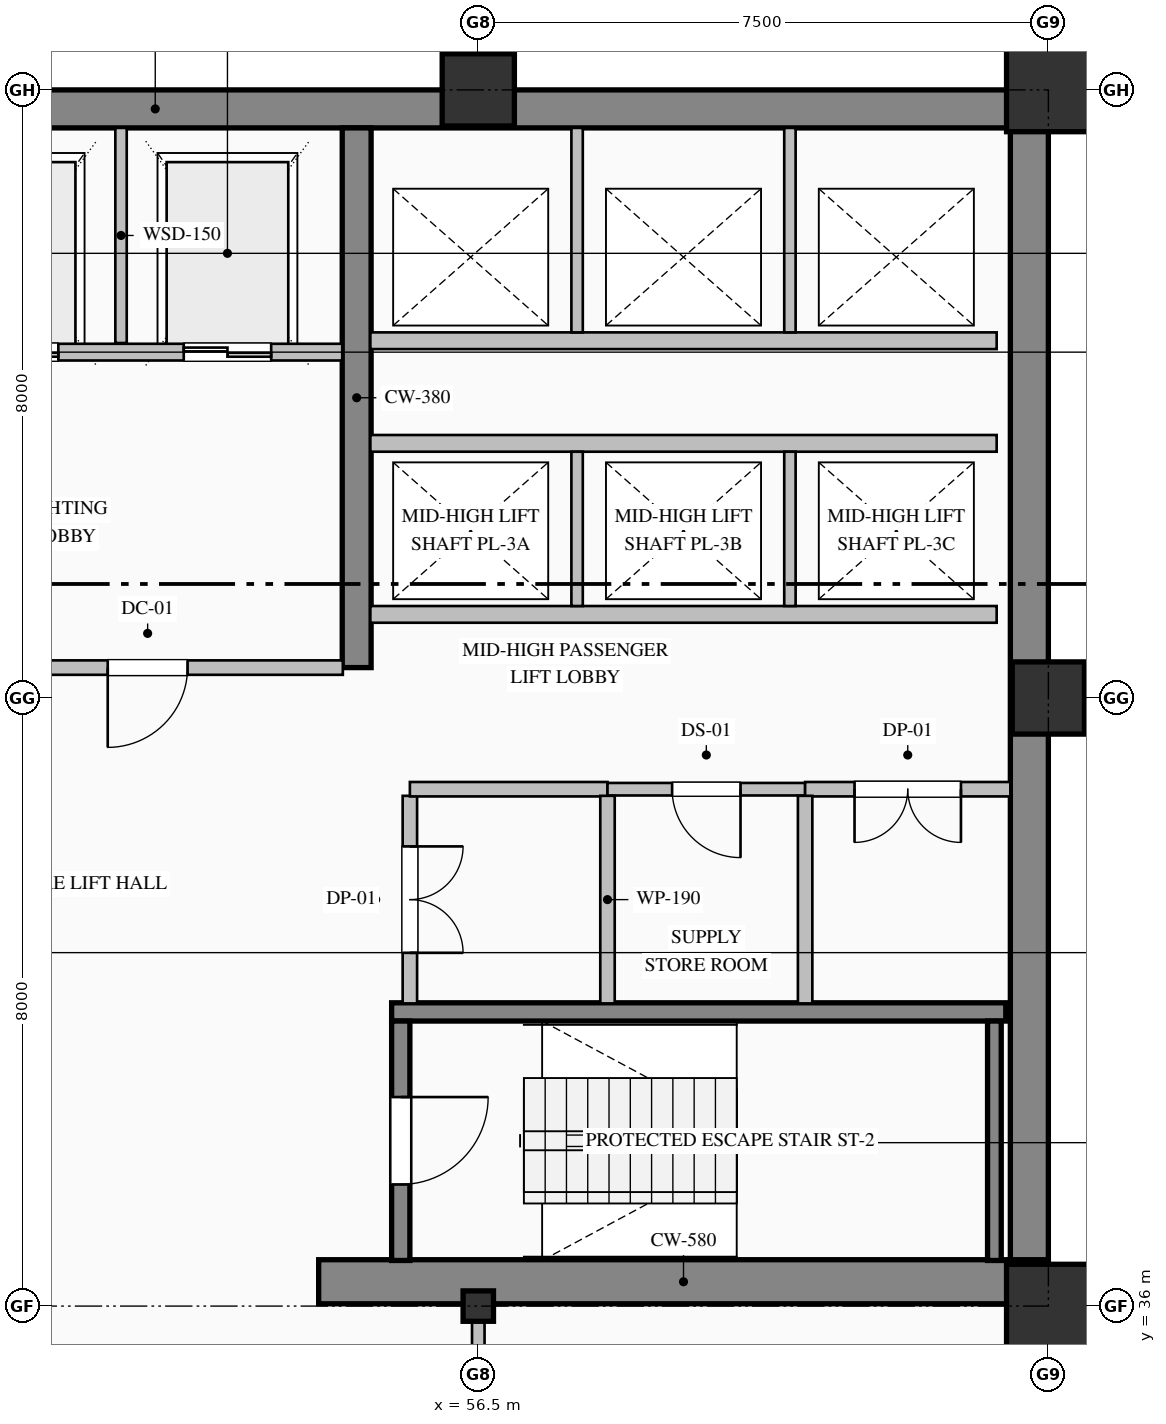
"""IFC4 building model, lengths in metres.
Left out: names, types, materials, properties, quantities, classifications, styles, units other than length and angle.
Written with IfcOpenShell. Run it as: python <this file> out.ifc"""

import sys

from ifc_helpers import new_model, si_unit, direction, frame, frame_2d, origin, origin_2d, place, context, subcontext, project, spatial, rectangle, hollow_rectangle, i_section, extrude, element, fill, save


model = new_model("IFC4")
c1 = context("Model", 3, precision=1e-05, world=origin(), true_north=direction((0.0, 1.0)))
c2 = subcontext(c1, "Body", "Model", "MODEL_VIEW")
j1 = project(units=[si_unit("LENGTHUNIT", "METRE"), si_unit("PLANEANGLEUNIT", "RADIAN")], contexts=[c1])
p1 = place(None, origin())
s1 = spatial("IfcSite", under=j1, at=p1, CompositionType="ELEMENT")
p2 = place(p1, origin())
s2 = spatial("IfcBuilding", under=s1, at=p2, CompositionType="ELEMENT")
p3 = place(p2, frame((0.0, 0.0, 143.0)))
s3 = spatial("IfcBuildingStorey", under=s2, at=p3, CompositionType="ELEMENT", Elevation=143.0)
p4 = place(p3, frame((40.5, 51.75, 0.0), z_axis=(0.0, 0.0, 1.0), x_axis=(1.0, 0.0, 0.0)))
e1 = element("IfcWall", 1, at=p4, inside=s3, PredefinedType="SHEAR", context=c2, shape_type="SweptSolid", body=[
    extrude(rectangle(XDim=23.5, YDim=0.5, at=frame_2d((11.75, 0.0))), origin(), (0.0, 0.0, 1.0), 3.765),
])
p5 = place(p3, frame((63.75, 36.32, 0.0), z_axis=(0.0, 0.0, 1.0), x_axis=(0.0, 1.0, 0.0)))
e2 = element("IfcWall", 2, at=p5, inside=s3, PredefinedType="SHEAR", context=c2, shape_type="SweptSolid", body=[
    extrude(rectangle(XDim=15.18, YDim=0.5, at=frame_2d((7.59, 0.0))), origin(), (0.0, 0.0, 1.0), 3.765),
])
p6 = place(p3, frame((54.4, 36.32, 0.0), z_axis=(0.0, 0.0, 1.0), x_axis=(1.0, 0.0, 0.0)))
e3 = element("IfcWall", 3, at=p6, inside=s3, PredefinedType="SHEAR", context=c2, shape_type="SweptSolid", body=[
    extrude(rectangle(XDim=9.6, YDim=0.58, at=frame_2d((4.8, 0.0))), origin(), (0.0, 0.0, 1.0), 4.0),
])
p7 = place(p3, frame((54.9, 44.4, 0.0), z_axis=(0.0, 0.0, 1.0), x_axis=(0.0, 1.0, 0.0)))
e4 = element("IfcWall", 4, at=p7, inside=s3, PredefinedType="SHEAR", context=c2, shape_type="SweptSolid", body=[
    extrude(rectangle(XDim=7.1, YDim=0.38, at=frame_2d((3.55, 0.0))), origin(), (0.0, 0.0, 1.0), 3.765),
])
p8 = place(p3, frame((56.5, 36.0, 0.0), z_axis=(0.0, 0.0, 1.0), x_axis=(1.0, 0.0, 0.0)))
e5 = element("IfcColumn", 5, at=p8, inside=s3, PredefinedType="COLUMN", context=c2, shape_type="SweptSolid", body=[
    extrude(i_section(OverallWidth=0.4, OverallDepth=0.4, WebThickness=0.013, FlangeThickness=0.021, FilletRadius=0.022, at=origin_2d()), origin(), (0.0, 0.0, 1.0), 4.0),
])
p9 = place(p3, frame((56.5, 52.0, 0.0), z_axis=(0.0, 0.0, 1.0), x_axis=(1.0, 0.0, 0.0)))
e6 = element("IfcColumn", 6, at=p9, inside=s3, PredefinedType="COLUMN", context=c2, shape_type="SweptSolid", body=[
    extrude(hollow_rectangle(XDim=0.95, YDim=0.95, WallThickness=0.036, at=origin_2d()), origin(), (0.0, 0.0, 1.0), 4.0),
])
p10 = place(p3, frame((64.0, 36.0, 0.0), z_axis=(0.0, 0.0, 1.0), x_axis=(1.0, 0.0, 0.0)))
e7 = element("IfcColumn", 7, at=p10, inside=s3, PredefinedType="COLUMN", context=c2, shape_type="SweptSolid", body=[
    extrude(hollow_rectangle(XDim=1.1, YDim=1.1, WallThickness=0.04, at=origin_2d()), origin(), (0.0, 0.0, 1.0), 4.0),
])
p11 = place(p3, frame((64.0, 44.0, 0.0), z_axis=(0.0, 0.0, 1.0), x_axis=(1.0, 0.0, 0.0)))
e8 = element("IfcColumn", 8, at=p11, inside=s3, PredefinedType="COLUMN", context=c2, shape_type="SweptSolid", body=[
    extrude(hollow_rectangle(XDim=0.95, YDim=0.95, WallThickness=0.036, at=origin_2d()), origin(), (0.0, 0.0, 1.0), 4.0),
])
p12 = place(p3, frame((64.0, 52.0, 0.0), z_axis=(0.0, 0.0, 1.0), x_axis=(1.0, 0.0, 0.0)))
e9 = element("IfcColumn", 9, at=p12, inside=s3, PredefinedType="COLUMN", context=c2, shape_type="SweptSolid", body=[
    extrude(hollow_rectangle(XDim=1.1, YDim=1.1, WallThickness=0.04, at=origin_2d()), origin(), (0.0, 0.0, 1.0), 4.0),
])
p13 = place(p3, frame((63.83, 36.05, 0.0), z_axis=(0.0, 0.0, 1.0), x_axis=(0.0, -1.0, 0.0)))
e10 = element("IfcWall", 10, at=p13, inside=s3, PredefinedType="SOLIDWALL", context=c2, shape_type="SweptSolid", body=[
    extrude(rectangle(XDim=28.05, YDim=0.34, at=frame_2d((14.025, 0.0))), origin(), (0.0, 0.0, 1.0), 3.265),
])
p14 = place(p13, frame((2.775, 0.0, 0.85)))
e11 = element("IfcOpeningElement", 11, at=p14, cuts=e10, PredefinedType="OPENING", context=c2, shape_type="SweptSolid", body=[
    extrude(rectangle(XDim=1.65, YDim=1.95, at=frame_2d((0.825, 0.975))), frame((0.0, 0.18, 0.0), z_axis=(0.0, -1.0, 0.0), x_axis=(1.0, 0.0, 0.0)), (0.0, 0.0, 1.0), 0.36),
])
p15 = place(p13, frame((10.05, 0.0, 0.85)))
e12 = element("IfcOpeningElement", 12, at=p15, cuts=e10, PredefinedType="OPENING", context=c2, shape_type="SweptSolid", body=[
    extrude(rectangle(XDim=1.5, YDim=1.95, at=frame_2d((0.75, 0.975))), frame((0.0, 0.18, 0.0), z_axis=(0.0, -1.0, 0.0), x_axis=(1.0, 0.0, 0.0)), (0.0, 0.0, 1.0), 0.36),
])
p16 = place(p3, frame((55.36, 39.87, 0.0), z_axis=(0.0, 0.0, 1.0), x_axis=(1.0, 0.0, 0.0)))
e13 = element("IfcWall", 13, at=p16, inside=s3, PredefinedType="SOLIDWALL", context=c2, shape_type="SweptSolid", body=[
    extrude(rectangle(XDim=8.08, YDim=0.24, at=frame_2d((4.04, 0.0))), origin(), (0.0, 0.0, 1.0), 4.0),
])
p17 = place(p3, frame((55.48, 39.75, 0.0), z_axis=(0.0, 0.0, 1.0), x_axis=(0.0, -1.0, 0.0)))
e14 = element("IfcWall", 14, at=p17, inside=s3, PredefinedType="SOLIDWALL", context=c2, shape_type="SweptSolid", body=[
    extrude(rectangle(XDim=3.15, YDim=0.24, at=frame_2d((1.575, 0.0))), origin(), (0.0, 0.0, 1.0), 4.0),
])
p18 = place(p17, frame((1.0, 0.0, 0.0)))
e15 = element("IfcOpeningElement", 15, at=p18, cuts=e14, PredefinedType="OPENING", context=c2, shape_type="SweptSolid", body=[
    extrude(rectangle(XDim=1.15, YDim=2.2, at=frame_2d((0.575, 1.1))), frame((0.0, 0.13, 0.0), z_axis=(0.0, -1.0, 0.0), x_axis=(1.0, 0.0, 0.0)), (0.0, 0.0, 1.0), 0.26),
])
p19 = place(p3, frame((63.29, 36.6, 0.0), z_axis=(0.0, 0.0, 1.0), x_axis=(0.0, 1.0, 0.0)))
e16 = element("IfcWall", 16, at=p19, inside=s3, PredefinedType="SOLIDWALL", context=c2, shape_type="SweptSolid", body=[
    extrude(rectangle(XDim=3.15, YDim=0.18, at=frame_2d((1.575, 0.0))), origin(), (0.0, 0.0, 1.0), 4.0),
])
p20 = place(p3, frame((54.71, 48.55, 0.0), z_axis=(0.0, 0.0, 1.0), x_axis=(-1.0, 0.0, 0.0)))
e17 = element("IfcWall", 17, at=p20, inside=s3, PredefinedType="PARTITIONING", context=c2, shape_type="SweptSolid", body=[
    extrude(rectangle(XDim=5.12, YDim=0.22, at=frame_2d((2.56, 0.0))), origin(), (0.0, 0.0, 1.0), 3.765),
])
p21 = place(p20, frame((3.735, 0.0, 0.0)))
e18 = element("IfcOpeningElement", 18, at=p21, cuts=e17, PredefinedType="OPENING", context=c2, shape_type="SweptSolid", body=[
    extrude(rectangle(XDim=1.15, YDim=2.2, at=frame_2d((0.575, 1.1))), frame((0.0, 0.12, 0.0), z_axis=(0.0, -1.0, 0.0), x_axis=(1.0, 0.0, 0.0)), (0.0, 0.0, 1.0), 0.24),
])
p22 = place(p20, frame((0.935, 0.0, 0.0)))
e19 = element("IfcOpeningElement", 19, at=p22, cuts=e17, PredefinedType="OPENING", context=c2, shape_type="SweptSolid", body=[
    extrude(rectangle(XDim=1.15, YDim=2.2, at=frame_2d((0.575, 1.1))), frame((0.0, 0.12, 0.0), z_axis=(0.0, -1.0, 0.0), x_axis=(1.0, 0.0, 0.0)), (0.0, 0.0, 1.0), 0.24),
])
p23 = place(p3, frame((51.8, 48.67, 0.0), z_axis=(0.0, 0.0, 1.0), x_axis=(0.0, 1.0, 0.0)))
e20 = element("IfcWall", 20, at=p23, inside=s3, PredefinedType="PARTITIONING", context=c2, shape_type="SweptSolid", body=[
    extrude(rectangle(XDim=2.83, YDim=0.15, at=frame_2d((1.415, 0.0))), origin(), (0.0, 0.0, 1.0), 3.765),
])
for number, where, z_axis, x_axis in (
    (21, (63.32, 45.1, 0.0), (0.0, 0.0, 1.0), (-1.0, 0.0, 0.0)),
    (22, (55.08, 47.35, 0.0), (0.0, 0.0, 1.0), (1.0, 0.0, 0.0)),
):
    element("IfcWall", number, at=place(p3, frame(where, z_axis=z_axis, x_axis=x_axis)), inside=s3, PredefinedType="PARTITIONING", context=c2, shape_type="SweptSolid", body=[
        extrude(rectangle(XDim=8.24, YDim=0.22, at=frame_2d((4.12, 0.0))), origin(), (0.0, 0.0, 1.0), 3.765),
    ])
for number, where, z_axis, x_axis in (
    (23, (57.8, 45.21, 0.0), (0.0, 0.0, 1.0), (0.0, 1.0, 0.0)),
    (24, (60.6, 45.21, 0.0), (0.0, 0.0, 1.0), (0.0, 1.0, 0.0)),
):
    element("IfcWall", number, at=place(p3, frame(where, z_axis=z_axis, x_axis=x_axis)), inside=s3, PredefinedType="PARTITIONING", context=c2, shape_type="SweptSolid", body=[
        extrude(rectangle(XDim=2.03, YDim=0.15, at=frame_2d((1.015, 0.0))), origin(), (0.0, 0.0, 1.0), 3.765),
    ])
p24 = place(p3, frame((63.32, 48.7, 0.0), z_axis=(0.0, 0.0, 1.0), x_axis=(-1.0, 0.0, 0.0)))
e25 = element("IfcWall", 25, at=p24, inside=s3, PredefinedType="PARTITIONING", context=c2, shape_type="SweptSolid", body=[
    extrude(rectangle(XDim=8.24, YDim=0.22, at=frame_2d((4.12, 0.0))), origin(), (0.0, 0.0, 1.0), 3.765),
])
for number, where, z_axis, x_axis in (
    (26, (57.8, 48.81, 0.0), (0.0, 0.0, 1.0), (0.0, 1.0, 0.0)),
    (27, (60.6, 48.81, 0.0), (0.0, 0.0, 1.0), (0.0, 1.0, 0.0)),
):
    element("IfcWall", number, at=place(p3, frame(where, z_axis=z_axis, x_axis=x_axis)), inside=s3, PredefinedType="PARTITIONING", context=c2, shape_type="SweptSolid", body=[
        extrude(rectangle(XDim=2.69, YDim=0.15, at=frame_2d((1.345, 0.0))), origin(), (0.0, 0.0, 1.0), 3.765),
    ])
p25 = place(p3, frame((54.718, 44.4, 0.0), z_axis=(0.0, 0.0, 1.0), x_axis=(-1.0, 0.0, 0.0)))
e28 = element("IfcWall", 28, at=p25, inside=s3, PredefinedType="PARTITIONING", context=c2, shape_type="SweptSolid", body=[
    extrude(rectangle(XDim=5.136, YDim=0.19, at=frame_2d((2.568, 0.0))), origin(), (0.0, 0.0, 1.0), 3.765),
])
p26 = place(p25, frame((2.043, 0.0, 0.0)))
e29 = element("IfcOpeningElement", 29, at=p26, cuts=e28, PredefinedType="OPENING", context=c2, shape_type="SweptSolid", body=[
    extrude(rectangle(XDim=1.05, YDim=2.15, at=frame_2d((0.525, 1.075))), frame((0.0, 0.105, 0.0), z_axis=(0.0, -1.0, 0.0), x_axis=(1.0, 0.0, 0.0)), (0.0, 0.0, 1.0), 0.21),
])
p27 = place(p3, frame((55.6, 42.713, 0.0), z_axis=(0.0, 0.0, 1.0), x_axis=(0.0, -1.0, 0.0)))
e30 = element("IfcWall", 30, at=p27, inside=s3, PredefinedType="PARTITIONING", context=c2, shape_type="SweptSolid", body=[
    extrude(rectangle(XDim=2.731, YDim=0.19, at=frame_2d((1.365, 0.0))), origin(), (0.0, 0.0, 1.0), 3.765),
])
p28 = place(p27, frame((0.666, 0.0, 0.0)))
e31 = element("IfcOpeningElement", 31, at=p28, cuts=e30, PredefinedType="OPENING", context=c2, shape_type="SweptSolid", body=[
    extrude(rectangle(XDim=1.4, YDim=2.25, at=frame_2d((0.7, 1.125))), frame((0.0, 0.105, 0.0), z_axis=(0.0, -1.0, 0.0), x_axis=(1.0, 0.0, 0.0)), (0.0, 0.0, 1.0), 0.21),
])
p29 = place(p3, frame((58.2, 42.8, 0.0), z_axis=(0.0, 0.0, 1.0), x_axis=(-1.0, 0.0, 0.0)))
e32 = element("IfcWall", 32, at=p29, inside=s3, PredefinedType="PARTITIONING", context=c2, shape_type="SweptSolid", body=[
    extrude(rectangle(XDim=2.6, YDim=0.19, at=frame_2d((1.3, 0.0))), origin(), (0.0, 0.0, 1.0), 3.765),
])
p30 = place(p3, frame((60.8, 42.8, 0.0), z_axis=(0.0, 0.0, 1.0), x_axis=(-1.0, 0.0, 0.0)))
e33 = element("IfcWall", 33, at=p30, inside=s3, PredefinedType="PARTITIONING", context=c2, shape_type="SweptSolid", body=[
    extrude(rectangle(XDim=2.6, YDim=0.165, at=frame_2d((1.3, 0.0))), origin(), (0.0, 0.0, 1.0), 3.765),
])
p31 = place(p30, frame((0.85, 0.0, 0.0)))
e34 = element("IfcOpeningElement", 34, at=p31, cuts=e33, PredefinedType="OPENING", context=c2, shape_type="SweptSolid", body=[
    extrude(rectangle(XDim=0.9, YDim=2.15, at=frame_2d((0.45, 1.075))), frame((0.0, 0.093, 0.0), z_axis=(0.0, -1.0, 0.0), x_axis=(1.0, 0.0, 0.0)), (0.0, 0.0, 1.0), 0.185),
])
p32 = place(p3, frame((63.5, 42.8, 0.0), z_axis=(0.0, 0.0, 1.0), x_axis=(-1.0, 0.0, 0.0)))
e35 = element("IfcWall", 35, at=p32, inside=s3, PredefinedType="PARTITIONING", context=c2, shape_type="SweptSolid", body=[
    extrude(rectangle(XDim=2.7, YDim=0.19, at=frame_2d((1.35, 0.0))), origin(), (0.0, 0.0, 1.0), 3.765),
])
p33 = place(p32, frame((0.65, 0.0, 0.0)))
e36 = element("IfcOpeningElement", 36, at=p33, cuts=e35, PredefinedType="OPENING", context=c2, shape_type="SweptSolid", body=[
    extrude(rectangle(XDim=1.4, YDim=2.25, at=frame_2d((0.7, 1.125))), frame((0.0, 0.105, 0.0), z_axis=(0.0, -1.0, 0.0), x_axis=(1.0, 0.0, 0.0)), (0.0, 0.0, 1.0), 0.21),
])
for number, where, z_axis, x_axis in (
    (37, (58.2, 42.713, 0.0), (0.0, 0.0, 1.0), (0.0, -1.0, 0.0)),
    (38, (60.8, 42.713, 0.0), (0.0, 0.0, 1.0), (0.0, -1.0, 0.0)),
):
    element("IfcWall", number, at=place(p3, frame(where, z_axis=z_axis, x_axis=x_axis)), inside=s3, PredefinedType="PARTITIONING", context=c2, shape_type="SweptSolid", body=[
        extrude(rectangle(XDim=2.731, YDim=0.19, at=frame_2d((1.365, 0.0))), origin(), (0.0, 0.0, 1.0), 3.765),
    ])
p34 = place(p3, frame((56.5, 36.0, 0.0), z_axis=(0.0, 0.0, 1.0), x_axis=(0.0, -1.0, 0.0)))
e39 = element("IfcWall", 39, at=p34, inside=s3, PredefinedType="PARTITIONING", context=c2, shape_type="SweptSolid", body=[
    extrude(rectangle(XDim=2.325, YDim=0.165, at=frame_2d((1.163, 0.0))), origin(), (0.0, 0.0, 1.0), 3.157),
])
p35 = place(p18, origin())
e40 = element("IfcDoor", 40, at=p35, inside=s3, OperationType="SINGLE_SWING_LEFT", PredefinedType="DOOR", context=c2, shape_type="SweptSolid", body=[
    extrude(rectangle(XDim=1.15, YDim=2.2, at=frame_2d((0.575, 1.1))), frame((0.0, 0.025, 0.0), z_axis=(0.0, -1.0, 0.0), x_axis=(1.0, 0.0, 0.0)), (0.0, 0.0, 1.0), 0.05),
])
fill(e15, e40)
p36 = place(p21, origin())
e41 = element("IfcDoor", 41, at=p36, inside=s3, OperationType="DOUBLE_DOOR_SLIDING", PredefinedType="DOOR", context=c2, shape_type="SweptSolid", body=[
    extrude(rectangle(XDim=1.15, YDim=2.2, at=frame_2d((0.575, 1.1))), frame((0.0, 0.025, 0.0), z_axis=(0.0, -1.0, 0.0), x_axis=(1.0, 0.0, 0.0)), (0.0, 0.0, 1.0), 0.05),
])
fill(e18, e41)
p37 = place(p22, origin())
e42 = element("IfcDoor", 42, at=p37, inside=s3, OperationType="DOUBLE_DOOR_SLIDING", PredefinedType="DOOR", context=c2, shape_type="SweptSolid", body=[
    extrude(rectangle(XDim=1.15, YDim=2.2, at=frame_2d((0.575, 1.1))), frame((0.0, 0.025, 0.0), z_axis=(0.0, -1.0, 0.0), x_axis=(1.0, 0.0, 0.0)), (0.0, 0.0, 1.0), 0.05),
])
fill(e19, e42)
p38 = place(p26, origin())
e43 = element("IfcDoor", 43, at=p38, inside=s3, OperationType="SINGLE_SWING_RIGHT", PredefinedType="DOOR", context=c2, shape_type="SweptSolid", body=[
    extrude(rectangle(XDim=1.05, YDim=2.15, at=frame_2d((0.525, 1.075))), frame((0.0, 0.025, 0.0), z_axis=(0.0, -1.0, 0.0), x_axis=(1.0, 0.0, 0.0)), (0.0, 0.0, 1.0), 0.05),
])
fill(e29, e43)
p39 = place(p28, origin())
e44 = element("IfcDoor", 44, at=p39, inside=s3, OperationType="DOUBLE_DOOR_SINGLE_SWING", PredefinedType="DOOR", context=c2, shape_type="SweptSolid", body=[
    extrude(rectangle(XDim=1.4, YDim=2.25, at=frame_2d((0.7, 1.125))), frame((0.0, 0.025, 0.0), z_axis=(0.0, -1.0, 0.0), x_axis=(1.0, 0.0, 0.0)), (0.0, 0.0, 1.0), 0.05),
])
fill(e31, e44)
p40 = place(p31, origin())
e45 = element("IfcDoor", 45, at=p40, inside=s3, OperationType="SINGLE_SWING_LEFT", PredefinedType="DOOR", context=c2, shape_type="SweptSolid", body=[
    extrude(rectangle(XDim=0.9, YDim=2.15, at=frame_2d((0.45, 1.075))), frame((0.0, 0.025, 0.0), z_axis=(0.0, -1.0, 0.0), x_axis=(1.0, 0.0, 0.0)), (0.0, 0.0, 1.0), 0.05),
])
fill(e34, e45)
p41 = place(p33, origin())
e46 = element("IfcDoor", 46, at=p41, inside=s3, OperationType="DOUBLE_DOOR_SINGLE_SWING", PredefinedType="DOOR", context=c2, shape_type="SweptSolid", body=[
    extrude(rectangle(XDim=1.4, YDim=2.25, at=frame_2d((0.7, 1.125))), frame((0.0, 0.025, 0.0), z_axis=(0.0, -1.0, 0.0), x_axis=(1.0, 0.0, 0.0)), (0.0, 0.0, 1.0), 0.05),
])
fill(e36, e46)
save(model, sys.argv[1])
